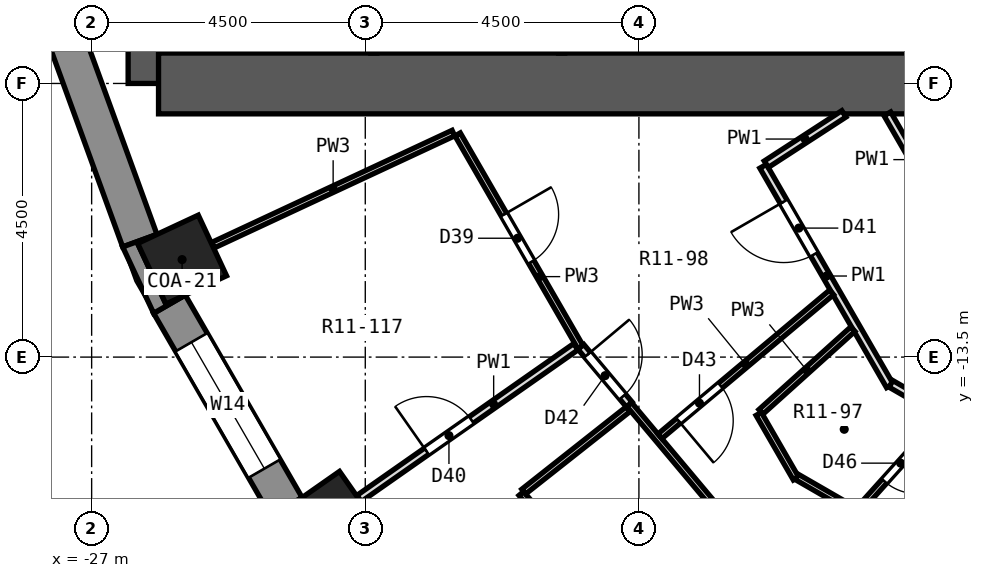
"""IFC4 building model, lengths in metres.
Left out: names, types, materials, properties, quantities, classifications, styles, units other than length and angle.
Written with IfcOpenShell. Run it as: python <this file> out.ifc"""

import sys

from ifc_helpers import new_model, si_unit, direction, frame, frame_2d, origin, origin_2d, place, context, subcontext, project, spatial, polyline, rectangle, outline, extrude, element, fill, save


model = new_model("IFC4")
c1 = context("Model", 3, precision=1e-05, world=origin(), true_north=direction((0.0, 1.0)))
c2 = subcontext(c1, "Body", "Model", "MODEL_VIEW")
j1 = project(units=[si_unit("LENGTHUNIT", "METRE"), si_unit("PLANEANGLEUNIT", "RADIAN")], contexts=[c1])
p1 = place(None, origin())
s1 = spatial("IfcSite", under=j1, at=p1, CompositionType="ELEMENT")
p2 = place(p1, origin())
s2 = spatial("IfcBuilding", under=s1, at=p2, CompositionType="ELEMENT")
p3 = place(p2, frame((0.0, 0.0, 46.1)))
s3 = spatial("IfcBuildingStorey", under=s2, at=p3, CompositionType="ELEMENT", Elevation=46.1)
for number, where, z_axis, x_axis in (
    (1, (-25.512, -11.897, 0.0), (0.0, 0.0, 1.0), (-0.906, -0.423, 0.0)),
    (2, (-23.059, -16.146, 0.0), (0.0, 0.0, 1.0), (-0.819, -0.574, 0.0)),
):
    element("IfcColumn", number, at=place(p3, frame(where, z_axis=z_axis, x_axis=x_axis)), inside=s3, PredefinedType="COLUMN", context=c2, shape_type="SweptSolid", body=[
        extrude(rectangle(XDim=1.1, YDim=1.1, at=origin_2d()), origin(), (0.0, 0.0, 1.0), 3.3),
    ])
p4 = place(p3, frame((-13.5, -9.0, 0.0), z_axis=(0.0, 0.0, 1.0), x_axis=(0.0, 1.0, 0.0)))
e3 = element("IfcWall", 3, at=p4, inside=s3, PredefinedType="SHEAR", context=c2, shape_type="SweptSolid", body=[
    extrude(rectangle(XDim=18.0, YDim=1.0, at=frame_2d((9.0, 0.0))), origin(), (0.0, 0.0, 1.0), 3.3),
])
p5 = place(p4, frame((15.4, 0.0, 0.0)))
e4 = element("IfcOpeningElement", 4, at=p5, cuts=e3, PredefinedType="OPENING", context=c2, shape_type="SweptSolid", body=[
    extrude(rectangle(XDim=1.2, YDim=2.1, at=frame_2d((0.6, 1.05))), frame((0.0, 0.512, 0.0), z_axis=(0.0, -1.0, 0.0), x_axis=(1.0, 0.0, 0.0)), (0.0, 0.0, 1.0), 1.024),
])
p6 = place(p4, frame((1.4, 0.0, 0.0)))
e5 = element("IfcOpeningElement", 5, at=p6, cuts=e3, PredefinedType="OPENING", context=c2, shape_type="SweptSolid", body=[
    extrude(rectangle(XDim=1.2, YDim=2.1, at=frame_2d((0.6, 1.05))), frame((0.0, 0.512, 0.0), z_axis=(0.0, -1.0, 0.0), x_axis=(1.0, 0.0, 0.0)), (0.0, 0.0, 1.0), 1.024),
])
p7 = place(p4, frame((7.5, 0.0, 0.0)))
e6 = element("IfcOpeningElement", 6, at=p7, cuts=e3, PredefinedType="OPENING", context=c2, shape_type="SweptSolid", body=[
    extrude(rectangle(XDim=3.0, YDim=2.4, at=frame_2d((1.5, 1.2))), frame((0.0, 0.512, 0.0), z_axis=(0.0, -1.0, 0.0), x_axis=(1.0, 0.0, 0.0)), (0.0, 0.0, 1.0), 1.024),
])
p8 = place(p3, frame((-25.9, -9.0, 0.0), z_axis=(0.0, 0.0, 1.0), x_axis=(0.0, 1.0, 0.0)))
e7 = element("IfcWall", 7, at=p8, inside=s3, PredefinedType="SHEAR", context=c2, shape_type="SweptSolid", body=[
    extrude(rectangle(XDim=18.0, YDim=1.0, at=frame_2d((9.0, 0.0))), origin(), (0.0, 0.0, 1.0), 3.3),
])
p9 = place(p3, frame((-13.5, -9.0, 0.0), z_axis=(0.0, 0.0, 1.0), x_axis=(-1.0, 0.0, 0.0)))
e8 = element("IfcWall", 8, at=p9, inside=s3, PredefinedType="SHEAR", context=c2, shape_type="SweptSolid", body=[
    extrude(rectangle(XDim=12.4, YDim=1.0, at=frame_2d((6.2, 0.0))), origin(), (0.0, 0.0, 1.0), 3.3),
])
p10 = place(p3, frame((-27.523, -7.971, 0.0), z_axis=(0.0, 0.0, 1.0), x_axis=(0.342028474173, -0.939689588564, 0.0)))
e9 = element("IfcWall", 9, at=p10, inside=s3, PredefinedType="SOLIDWALL", context=c2, shape_type="SweptSolid", body=[
    extrude(rectangle(XDim=3.846, YDim=0.6, at=frame_2d((1.923, 0.0))), origin(), (0.0, 0.0, 1.0), 2.75),
])
p11 = place(p3, frame((-25.721, -12.63, 0.0), z_axis=(0.0, 0.0, 1.0), x_axis=(0.499989888488, -0.86603124159, 0.0)))
e10 = element("IfcWall", 10, at=p11, inside=s3, PredefinedType="SOLIDWALL", context=c2, shape_type="SweptSolid", body=[
    extrude(rectangle(XDim=3.846, YDim=0.6, at=frame_2d((1.923, 0.0))), origin(), (0.0, 0.0, 1.0), 2.75),
])
p12 = place(p11, frame((0.723, 0.0, 0.9)))
e11 = element("IfcOpeningElement", 11, at=p12, cuts=e10, PredefinedType="OPENING", context=c2, shape_type="SweptSolid", body=[
    extrude(rectangle(XDim=2.4, YDim=1.8, at=frame_2d((1.2, 0.9))), frame((0.0, 0.312, 0.0), z_axis=(0.0, -1.0, 0.0), x_axis=(1.0, 0.0, 0.0)), (0.0, 0.0, 1.0), 0.624),
])
p13 = place(p3, origin())
e12 = element("IfcWall", 12, at=p13, inside=s3, PredefinedType="SOLIDWALL", context=c2, shape_type="SweptSolid", body=[
    extrude(outline(polyline([(-25.981, -12.78), (-25.461, -12.479), (-25.779, -12.628), (-26.243, -11.631), (-25.926, -11.483), (-26.49, -11.688), (-25.981, -12.78)])), origin(), (0.0, 0.0, 1.0), 2.75),
])
p14 = place(p3, origin())
e13 = element("IfcWall", 13, at=p14, inside=s3, PredefinedType="SOLIDWALL", context=c2, shape_type="SweptSolid", body=[
    extrude(outline(polyline([(-24.058, -16.11), (-23.367, -17.097), (-22.907, -16.711), (-23.194, -16.912), (-23.825, -16.011), (-23.538, -15.81), (-24.058, -16.11)])), origin(), (0.0, 0.0, 1.0), 2.75),
])
p15 = place(p3, frame((-20.981, -9.838, 0.0), z_axis=(0.0, 0.0, 1.0), x_axis=(0.500011837539, -0.86601856927, 0.0)))
e14 = element("IfcWall", 14, at=p15, inside=s3, PredefinedType="PARTITIONING", context=c2, shape_type="SweptSolid", body=[
    extrude(rectangle(XDim=4.041, YDim=0.1, at=frame_2d((2.021, 0.0))), origin(), (0.0, 0.0, 1.0), 2.75),
])
p16 = place(p15, frame((1.521, 0.0, 0.0)))
e15 = element("IfcOpeningElement", 15, at=p16, cuts=e14, PredefinedType="OPENING", context=c2, shape_type="SweptSolid", body=[
    extrude(rectangle(XDim=0.9, YDim=2.1, at=frame_2d((0.45, 1.05))), frame((0.0, 0.062, 0.0), z_axis=(0.0, -1.0, 0.0), x_axis=(1.0, 0.0, 0.0)), (0.0, 0.0, 1.0), 0.124),
])
p17 = place(p3, frame((-16.03, -14.434, 0.0), z_axis=(0.0, 0.0, 1.0), x_axis=(0.499779910804, -0.866152435058, 0.0)))
e16 = element("IfcWall", 16, at=p17, inside=s3, PredefinedType="PARTITIONING", context=c2, shape_type="SweptSolid", body=[
    extrude(rectangle(XDim=1.226, YDim=0.1, at=frame_2d((0.613, 0.0))), origin(), (0.0, 0.0, 1.0), 2.75),
])
p18 = place(p3, frame((-15.957, -10.362, 0.0), z_axis=(0.0, 0.0, 1.0), x_axis=(0.500063859158, -0.865988531543, 0.0)))
e17 = element("IfcWall", 17, at=p18, inside=s3, PredefinedType="PARTITIONING", context=c2, shape_type="SweptSolid", body=[
    extrude(rectangle(XDim=4.168, YDim=0.125, at=frame_2d((2.084, 0.0))), origin(), (0.0, 0.0, 1.0), 2.75),
])
p19 = place(p18, frame((0.674, 0.0, 0.0)))
e18 = element("IfcOpeningElement", 18, at=p19, cuts=e17, PredefinedType="OPENING", context=c2, shape_type="SweptSolid", body=[
    extrude(rectangle(XDim=1.0, YDim=2.1, at=frame_2d((0.5, 1.05))), frame((0.0, 0.074, 0.0), z_axis=(0.0, -1.0, 0.0), x_axis=(1.0, 0.0, 0.0)), (0.0, 0.0, 1.0), 0.149),
])
p20 = place(p3, frame((-13.914, -9.5, 0.0), z_axis=(0.0, 0.0, 1.0), x_axis=(0.500066958712, -0.865986741702, 0.0)))
e19 = element("IfcWall", 19, at=p20, inside=s3, PredefinedType="PARTITIONING", context=c2, shape_type="SweptSolid", body=[
    extrude(rectangle(XDim=1.738, YDim=0.125, at=frame_2d((0.869, 0.0))), origin(), (0.0, 0.0, 1.0), 2.75),
])
p21 = place(p3, frame((-19.934, -15.743, 0.0), z_axis=(0.0, 0.0, 1.0), x_axis=(0.642726064959, -0.766096081064, 0.0)))
e20 = element("IfcWall", 20, at=p21, inside=s3, PredefinedType="PARTITIONING", context=c2, shape_type="SweptSolid", body=[
    extrude(rectangle(XDim=2.925, YDim=0.1, at=frame_2d((1.462, 0.0))), origin(), (0.0, 0.0, 1.0), 2.75),
])
p22 = place(p21, frame((1.087, 0.0, 0.0)))
e21 = element("IfcOpeningElement", 21, at=p22, cuts=e20, PredefinedType="OPENING", context=c2, shape_type="SweptSolid", body=[
    extrude(rectangle(XDim=0.8, YDim=2.1, at=frame_2d((0.4, 1.05))), frame((0.0, 0.062, 0.0), z_axis=(0.0, -1.0, 0.0), x_axis=(1.0, 0.0, 0.0)), (0.0, 0.0, 1.0), 0.124),
])
p23 = place(p3, frame((-18.16, -14.279, 0.0), z_axis=(0.0, 0.0, 1.0), x_axis=(0.642859397188, -0.765984200521, 0.0)))
e22 = element("IfcWall", 22, at=p23, inside=s3, PredefinedType="PARTITIONING", context=c2, shape_type="SweptSolid", body=[
    extrude(rectangle(XDim=2.806, YDim=0.1, at=frame_2d((1.403, 0.0))), origin(), (0.0, 0.0, 1.0), 2.75),
])
p24 = place(p3, frame((-18.954, -13.332, 0.0), z_axis=(0.0, 0.0, 1.0), x_axis=(0.642533660644, -0.766257459956, 0.0)))
e23 = element("IfcWall", 23, at=p24, inside=s3, PredefinedType="PARTITIONING", context=c2, shape_type="SweptSolid", body=[
    extrude(rectangle(XDim=1.235, YDim=0.125, at=frame_2d((0.618, 0.0))), origin(), (0.0, 0.0, 1.0), 2.75),
])
p25 = place(p24, frame((0.167, 0.0, 0.0)))
e24 = element("IfcOpeningElement", 24, at=p25, cuts=e23, PredefinedType="OPENING", context=c2, shape_type="SweptSolid", body=[
    extrude(rectangle(XDim=0.9, YDim=2.1, at=frame_2d((0.45, 1.05))), frame((0.0, 0.074, 0.0), z_axis=(0.0, -1.0, 0.0), x_axis=(1.0, 0.0, 0.0)), (0.0, 0.0, 1.0), 0.149),
])
p26 = place(p3, frame((-15.403, -15.471, 0.0), z_axis=(0.0, 0.0, 1.0), x_axis=(0.866117982198, -0.499839615189, 0.0)))
e25 = element("IfcWall", 25, at=p26, inside=s3, PredefinedType="PARTITIONING", context=c2, shape_type="SweptSolid", body=[
    extrude(rectangle(XDim=1.143, YDim=0.1, at=frame_2d((0.571, 0.0))), origin(), (0.0, 0.0, 1.0), 2.75),
])
p27 = place(p3, frame((-13.855, -13.94, 0.0), z_axis=(0.0, 0.0, 1.0), x_axis=(0.866024825845, -0.50000100102, 0.0)))
e26 = element("IfcWall", 26, at=p27, inside=s3, PredefinedType="PARTITIONING", context=c2, shape_type="SweptSolid", body=[
    extrude(rectangle(XDim=10.192, YDim=0.125, at=frame_2d((5.096, 0.0))), origin(), (0.0, 0.0, 1.0), 2.75),
])
p28 = place(p3, frame((-25.005, -11.66, 0.0), z_axis=(0.0, 0.0, 1.0), x_axis=(0.906326060206, 0.422579072591, 0.0)))
e27 = element("IfcWall", 27, at=p28, inside=s3, PredefinedType="PARTITIONING", context=c2, shape_type="SweptSolid", body=[
    extrude(rectangle(XDim=4.363, YDim=0.1, at=frame_2d((2.181, 0.0))), origin(), (0.0, 0.0, 1.0), 2.75),
])
p29 = place(p3, frame((-15.905, -10.328, 0.0), z_axis=(0.0, 0.0, 1.0), x_axis=(0.83882853689, 0.544395706908, 0.0)))
e28 = element("IfcWall", 28, at=p29, inside=s3, PredefinedType="PARTITIONING", context=c2, shape_type="SweptSolid", body=[
    extrude(rectangle(XDim=1.521, YDim=0.125, at=frame_2d((0.76, 0.0))), origin(), (0.0, 0.0, 1.0), 2.75),
])
p30 = place(p3, frame((-22.601, -15.825, 0.0), z_axis=(0.0, 0.0, 1.0), x_axis=(0.819158088694, 0.57356780395, 0.0)))
e29 = element("IfcWall", 29, at=p30, inside=s3, PredefinedType="PARTITIONING", context=c2, shape_type="SweptSolid", body=[
    extrude(rectangle(XDim=4.35, YDim=0.125, at=frame_2d((2.175, 0.0))), origin(), (0.0, 0.0, 1.0), 2.75),
])
p31 = place(p30, frame((1.353, 0.0, 0.0)))
e30 = element("IfcOpeningElement", 30, at=p31, cuts=e29, PredefinedType="OPENING", context=c2, shape_type="SweptSolid", body=[
    extrude(rectangle(XDim=0.9, YDim=2.1, at=frame_2d((0.45, 1.05))), frame((0.0, 0.074, 0.0), z_axis=(0.0, -1.0, 0.0), x_axis=(1.0, 0.0, 0.0)), (0.0, 0.0, 1.0), 0.149),
])
p32 = place(p3, frame((-19.895, -15.712, 0.0), z_axis=(0.0, 0.0, 1.0), x_axis=(0.784868488399, 0.619662372521, 0.0)))
e31 = element("IfcWall", 31, at=p32, inside=s3, PredefinedType="PARTITIONING", context=c2, shape_type="SweptSolid", body=[
    extrude(rectangle(XDim=2.189, YDim=0.1, at=frame_2d((1.094, 0.0))), origin(), (0.0, 0.0, 1.0), 2.75),
])
p33 = place(p3, frame((-17.655, -14.803, 0.0), z_axis=(0.0, 0.0, 1.0), x_axis=(0.766273613589, 0.642514396039, 0.0)))
e32 = element("IfcWall", 32, at=p33, inside=s3, PredefinedType="PARTITIONING", context=c2, shape_type="SweptSolid", body=[
    extrude(rectangle(XDim=3.685, YDim=0.1, at=frame_2d((1.843, 0.0))), origin(), (0.0, 0.0, 1.0), 2.75),
])
p34 = place(p33, frame((0.399, 0.0, 0.0)))
e33 = element("IfcOpeningElement", 33, at=p34, cuts=e32, PredefinedType="OPENING", context=c2, shape_type="SweptSolid", body=[
    extrude(rectangle(XDim=0.9, YDim=2.1, at=frame_2d((0.45, 1.05))), frame((0.0, 0.062, 0.0), z_axis=(0.0, -1.0, 0.0), x_axis=(1.0, 0.0, 0.0)), (0.0, 0.0, 1.0), 0.124),
])
p35 = place(p3, frame((-15.993, -14.401, 0.0), z_axis=(0.0, 0.0, 1.0), x_axis=(0.74316878737, 0.669103993022, 0.0)))
e34 = element("IfcWall", 34, at=p35, inside=s3, PredefinedType="PARTITIONING", context=c2, shape_type="SweptSolid", body=[
    extrude(rectangle(XDim=2.034, YDim=0.1, at=frame_2d((1.017, 0.0))), origin(), (0.0, 0.0, 1.0), 2.75),
])
p36 = place(p3, frame((-14.38, -16.005, 0.0), z_axis=(0.0, 0.0, 1.0), x_axis=(0.668334266264, 0.743861081478, 0.0)))
e35 = element("IfcWall", 35, at=p36, inside=s3, PredefinedType="PARTITIONING", context=c2, shape_type="SweptSolid", body=[
    extrude(rectangle(XDim=2.033, YDim=0.1, at=frame_2d((1.017, 0.0))), origin(), (0.0, 0.0, 1.0), 2.75),
])
p37 = place(p36, frame((0.623, 0.0, 0.0)))
e36 = element("IfcOpeningElement", 36, at=p37, cuts=e35, PredefinedType="OPENING", context=c2, shape_type="SweptSolid", body=[
    extrude(rectangle(XDim=0.8, YDim=2.1, at=frame_2d((0.4, 1.05))), frame((0.0, 0.062, 0.0), z_axis=(0.0, -1.0, 0.0), x_axis=(1.0, 0.0, 0.0)), (0.0, 0.0, 1.0), 0.124),
])
p38 = place(p3, frame((-19.27, -8.5, 0.0), z_axis=(0.0, 0.0, 1.0), x_axis=(0.0, 1.0, 0.0)))
e37 = element("IfcWall", 37, at=p38, inside=s3, PredefinedType="PARTITIONING", context=c2, shape_type="SweptSolid", body=[
    extrude(rectangle(XDim=3.2, YDim=0.1, at=frame_2d((1.6, 0.0))), origin(), (0.0, 0.0, 1.0), 2.75),
])
p39 = place(p3, frame((-22.36, -8.5, 0.0), z_axis=(0.0, 0.0, 1.0), x_axis=(0.0, 1.0, 0.0)))
e38 = element("IfcWall", 38, at=p39, inside=s3, PredefinedType="PARTITIONING", context=c2, shape_type="SweptSolid", body=[
    extrude(rectangle(XDim=3.2, YDim=0.1, at=frame_2d((1.6, 0.0))), origin(), (0.0, 0.0, 1.0), 2.75),
])
p40 = place(p39, frame((1.15, 0.0, 0.0)))
e39 = element("IfcOpeningElement", 39, at=p40, cuts=e38, PredefinedType="OPENING", context=c2, shape_type="SweptSolid", body=[
    extrude(rectangle(XDim=0.9, YDim=2.1, at=frame_2d((0.45, 1.05))), frame((0.0, 0.062, 0.0), z_axis=(0.0, -1.0, 0.0), x_axis=(1.0, 0.0, 0.0)), (0.0, 0.0, 1.0), 0.124),
])
p41 = place(p12, origin())
e40 = element("IfcWindow", 40, at=p41, inside=s3, PartitioningType="SINGLE_PANEL", PredefinedType="WINDOW", context=c2, shape_type="SweptSolid", body=[
    extrude(rectangle(XDim=2.4, YDim=1.8, at=frame_2d((1.2, 0.9))), frame((0.0, 0.18, 0.0), z_axis=(0.0, -1.0, 0.0), x_axis=(1.0, 0.0, 0.0)), (0.0, 0.0, 1.0), 0.06),
])
fill(e11, e40)
p42 = place(p16, origin())
e41 = element("IfcDoor", 41, at=p42, inside=s3, OperationType="SINGLE_SWING_LEFT", PredefinedType="DOOR", context=c2, shape_type="SweptSolid", body=[
    extrude(rectangle(XDim=0.9, YDim=2.1, at=frame_2d((0.45, 1.05))), frame((0.0, 0.025, 0.0), z_axis=(0.0, -1.0, 0.0), x_axis=(1.0, 0.0, 0.0)), (0.0, 0.0, 1.0), 0.05),
])
fill(e15, e41)
p43 = place(p31, origin())
e42 = element("IfcDoor", 42, at=p43, inside=s3, OperationType="SINGLE_SWING_LEFT", PredefinedType="DOOR", context=c2, shape_type="SweptSolid", body=[
    extrude(rectangle(XDim=0.9, YDim=2.1, at=frame_2d((0.45, 1.05))), frame((0.0, 0.025, 0.0), z_axis=(0.0, -1.0, 0.0), x_axis=(1.0, 0.0, 0.0)), (0.0, 0.0, 1.0), 0.05),
])
fill(e30, e42)
p44 = place(p19, frame((1.0, 0.0, 0.0), z_axis=(0.0, 0.0, 1.0), x_axis=(-1.0, 0.0, 0.0)))
e43 = element("IfcDoor", 43, at=p44, inside=s3, OperationType="SINGLE_SWING_RIGHT", PredefinedType="DOOR", context=c2, shape_type="SweptSolid", body=[
    extrude(rectangle(XDim=1.0, YDim=2.1, at=frame_2d((0.5, 1.05))), frame((0.0, 0.025, 0.0), z_axis=(0.0, -1.0, 0.0), x_axis=(1.0, 0.0, 0.0)), (0.0, 0.0, 1.0), 0.05),
])
fill(e18, e43)
p45 = place(p25, origin())
e44 = element("IfcDoor", 44, at=p45, inside=s3, OperationType="SINGLE_SWING_LEFT", PredefinedType="DOOR", context=c2, shape_type="SweptSolid", body=[
    extrude(rectangle(XDim=0.9, YDim=2.1, at=frame_2d((0.45, 1.05))), frame((0.0, 0.025, 0.0), z_axis=(0.0, -1.0, 0.0), x_axis=(1.0, 0.0, 0.0)), (0.0, 0.0, 1.0), 0.05),
])
fill(e24, e44)
p46 = place(p34, frame((0.9, 0.0, 0.0), z_axis=(0.0, 0.0, 1.0), x_axis=(-1.0, 0.0, 0.0)))
e45 = element("IfcDoor", 45, at=p46, inside=s3, OperationType="SINGLE_SWING_RIGHT", PredefinedType="DOOR", context=c2, shape_type="SweptSolid", body=[
    extrude(rectangle(XDim=0.9, YDim=2.1, at=frame_2d((0.45, 1.05))), frame((0.0, 0.025, 0.0), z_axis=(0.0, -1.0, 0.0), x_axis=(1.0, 0.0, 0.0)), (0.0, 0.0, 1.0), 0.05),
])
fill(e33, e45)
p47 = place(p37, frame((0.8, 0.0, 0.0), z_axis=(0.0, 0.0, 1.0), x_axis=(-1.0, 0.0, 0.0)))
e46 = element("IfcDoor", 46, at=p47, inside=s3, OperationType="SINGLE_SWING_LEFT", PredefinedType="DOOR", context=c2, shape_type="SweptSolid", body=[
    extrude(rectangle(XDim=0.8, YDim=2.1, at=frame_2d((0.4, 1.05))), frame((0.0, 0.025, 0.0), z_axis=(0.0, -1.0, 0.0), x_axis=(1.0, 0.0, 0.0)), (0.0, 0.0, 1.0), 0.05),
])
fill(e36, e46)
save(model, sys.argv[1])
